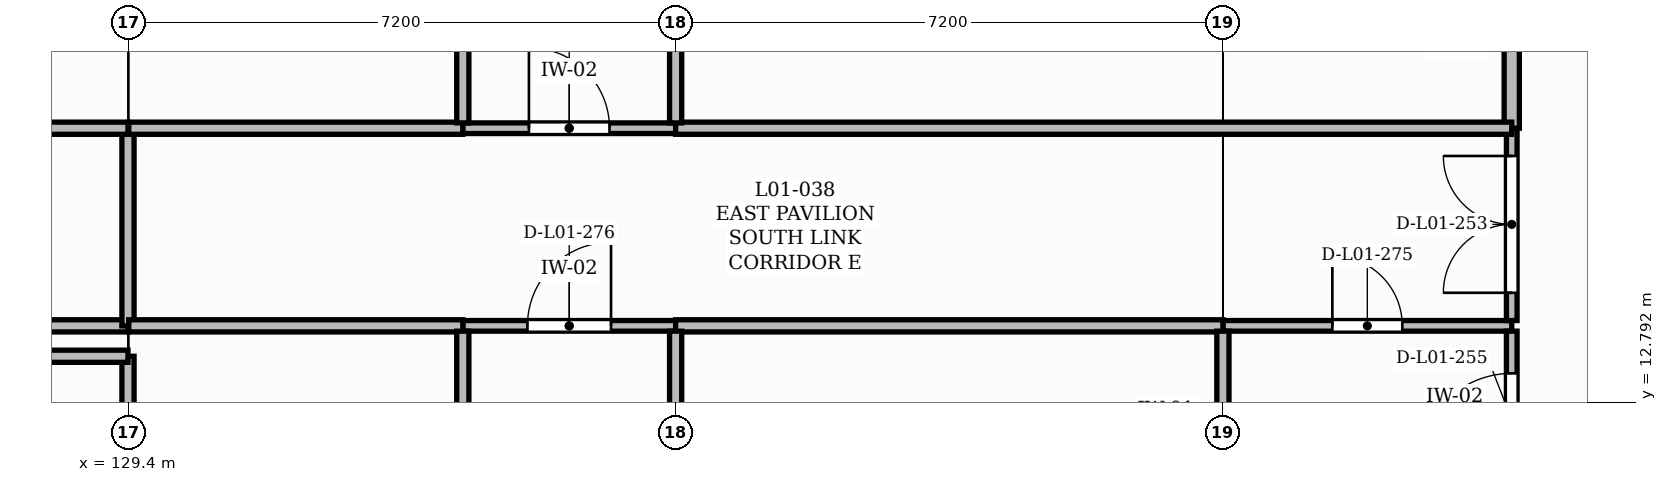
"""IFC4 building model, lengths in metres.
Left out: names, types, materials, properties, quantities, classifications, styles, units other than length and angle.
Written with IfcOpenShell. Run it as: python <this file> out.ifc"""

import sys

from ifc_helpers import new_model, si_unit, direction, frame, frame_2d, origin, place, context, subcontext, project, spatial, rectangle, extrude, element, fill, save


model = new_model("IFC4")
c1 = context("Model", 3, precision=1e-05, world=origin(), true_north=direction((0.0, 1.0)))
c2 = subcontext(c1, "Body", "Model", "MODEL_VIEW")
j1 = project(units=[si_unit("LENGTHUNIT", "METRE"), si_unit("PLANEANGLEUNIT", "RADIAN")], contexts=[c1])
p1 = place(None, origin())
s1 = spatial("IfcSite", under=j1, at=p1, CompositionType="ELEMENT")
p2 = place(p1, origin())
s2 = spatial("IfcBuilding", under=s1, at=p2, CompositionType="ELEMENT")
p3 = place(p2, frame((0.0, 0.0, 4.5)))
s3 = spatial("IfcBuildingStorey", under=s2, at=p3, CompositionType="ELEMENT", Elevation=4.5)
p4 = place(p3, frame((133.8, 13.8, 0.0), z_axis=(0.0, 0.0, 1.0), x_axis=(1.0, 0.0, 0.0)))
e1 = element("IfcWall", 1, at=p4, inside=s3, PredefinedType="PARTITIONING", context=c2, shape_type="SweptSolid", body=[
    extrude(rectangle(XDim=2.8, YDim=0.14, at=frame_2d((1.4, 0.0))), origin(), (0.0, 0.0, 1.0), 4.18),
])
p5 = place(p4, frame((0.85, 0.0, 0.0)))
e2 = element("IfcOpeningElement", 2, at=p5, cuts=e1, PredefinedType="OPENING", context=c2, shape_type="SweptSolid", body=[
    extrude(rectangle(XDim=1.1, YDim=2.1, at=frame_2d((0.55, 1.05))), frame((0.0, 0.08, 0.0), z_axis=(0.0, -1.0, 0.0), x_axis=(1.0, 0.0, 0.0)), (0.0, 0.0, 1.0), 0.16),
])
p6 = place(p3, frame((133.8, 16.4, 0.0), z_axis=(0.0, 0.0, 1.0), x_axis=(1.0, 0.0, 0.0)))
e3 = element("IfcWall", 3, at=p6, inside=s3, PredefinedType="PARTITIONING", context=c2, shape_type="SweptSolid", body=[
    extrude(rectangle(XDim=2.8, YDim=0.14, at=frame_2d((1.4, 0.0))), origin(), (0.0, 0.0, 1.0), 4.18),
])
p7 = place(p6, frame((0.87, 0.0, 0.0)))
e4 = element("IfcOpeningElement", 4, at=p7, cuts=e3, PredefinedType="OPENING", context=c2, shape_type="SweptSolid", body=[
    extrude(rectangle(XDim=1.06, YDim=2.15, at=frame_2d((0.53, 1.075))), frame((0.0, 0.08, 0.0), z_axis=(0.0, -1.0, 0.0), x_axis=(1.0, 0.0, 0.0)), (0.0, 0.0, 1.0), 0.16),
])
p8 = place(p3, frame((143.8, 13.8, 0.0), z_axis=(0.0, 0.0, 1.0), x_axis=(1.0, 0.0, 0.0)))
e5 = element("IfcWall", 5, at=p8, inside=s3, PredefinedType="PARTITIONING", context=c2, shape_type="SweptSolid", body=[
    extrude(rectangle(XDim=3.8, YDim=0.14, at=frame_2d((1.9, 0.0))), origin(), (0.0, 0.0, 1.0), 4.18),
])
p9 = place(p8, frame((1.44, 0.0, 0.0)))
e6 = element("IfcOpeningElement", 6, at=p9, cuts=e5, PredefinedType="OPENING", context=c2, shape_type="SweptSolid", body=[
    extrude(rectangle(XDim=0.92, YDim=2.1, at=frame_2d((0.46, 1.05))), frame((0.0, 0.08, 0.0), z_axis=(0.0, -1.0, 0.0), x_axis=(1.0, 0.0, 0.0)), (0.0, 0.0, 1.0), 0.16),
])
p10 = place(p3, frame((147.6, 11.4, 0.0), z_axis=(0.0, 0.0, 1.0), x_axis=(0.0, 1.0, 0.0)))
e7 = element("IfcWall", 7, at=p10, inside=s3, PredefinedType="PARTITIONING", context=c2, shape_type="SweptSolid", body=[
    extrude(rectangle(XDim=2.33, YDim=0.14, at=frame_2d((1.165, 0.0))), origin(), (0.0, 0.0, 1.0), 4.18),
])
p11 = place(p10, frame((0.555, 0.0, 0.0)))
e8 = element("IfcOpeningElement", 8, at=p11, cuts=e7, PredefinedType="OPENING", context=c2, shape_type="SweptSolid", body=[
    extrude(rectangle(XDim=1.22, YDim=2.1, at=frame_2d((0.61, 1.05))), frame((0.0, 0.08, 0.0), z_axis=(0.0, -1.0, 0.0), x_axis=(1.0, 0.0, 0.0)), (0.0, 0.0, 1.0), 0.16),
])
p12 = place(p3, frame((147.6, 13.87, 0.0), z_axis=(0.0, 0.0, 1.0), x_axis=(0.0, 1.0, 0.0)))
e9 = element("IfcWall", 9, at=p12, inside=s3, PredefinedType="PARTITIONING", context=c2, shape_type="SweptSolid", body=[
    extrude(rectangle(XDim=2.53, YDim=0.14, at=frame_2d((1.265, 0.0))), origin(), (0.0, 0.0, 1.0), 4.18),
])
p13 = place(p12, frame((0.365, 0.0, 0.0)))
e10 = element("IfcOpeningElement", 10, at=p13, cuts=e9, PredefinedType="OPENING", context=c2, shape_type="SweptSolid", body=[
    extrude(rectangle(XDim=1.8, YDim=2.3, at=frame_2d((0.9, 1.15))), frame((0.0, 0.08, 0.0), z_axis=(0.0, -1.0, 0.0), x_axis=(1.0, 0.0, 0.0)), (0.0, 0.0, 1.0), 0.16),
])
p14 = place(p3, frame((147.6, 16.4, 0.0), z_axis=(0.0, 0.0, 1.0), x_axis=(0.0, 1.0, 0.0)))
e11 = element("IfcWall", 11, at=p14, inside=s3, PredefinedType="PARTITIONING", context=c2, shape_type="SweptSolid", body=[
    extrude(rectangle(XDim=2.2, YDim=0.2, at=frame_2d((1.1, 0.0))), origin(), (0.0, 0.0, 1.0), 4.18),
])
p15 = place(p3, frame((129.395, 10.87, 0.0), z_axis=(0.0, 0.0, 1.0), x_axis=(0.0, 1.0, 0.0)))
e12 = element("IfcWall", 12, at=p15, inside=s3, PredefinedType="PARTITIONING", context=c2, shape_type="SweptSolid", body=[
    extrude(rectangle(XDim=2.53, YDim=0.16, at=frame_2d((1.265, 0.0))), origin(), (0.0, 0.0, 1.0), 4.18),
])
for number, where, z_axis, x_axis in (
    (13, (129.395, 13.4, 0.0), (0.0, 0.0, 1.0), (-1.0, 0.0, 0.0)),
    (14, (124.6, 13.8, 0.0), (0.0, 0.0, 1.0), (1.0, 0.0, 0.0)),
):
    element("IfcWall", number, at=place(p3, frame(where, z_axis=z_axis, x_axis=x_axis)), inside=s3, PredefinedType="PARTITIONING", context=c2, shape_type="SweptSolid", body=[
        extrude(rectangle(XDim=4.795, YDim=0.16, at=frame_2d((2.397, 0.0))), origin(), (0.0, 0.0, 1.0), 4.18),
    ])
p16 = place(p3, frame((129.395, 13.8, 0.0), z_axis=(0.0, 0.0, 1.0), x_axis=(0.0, 1.0, 0.0)))
e15 = element("IfcWall", 15, at=p16, inside=s3, PredefinedType="PARTITIONING", context=c2, shape_type="SweptSolid", body=[
    extrude(rectangle(XDim=2.6, YDim=0.16, at=frame_2d((1.3, 0.0))), origin(), (0.0, 0.0, 1.0), 4.18),
])
p17 = place(p3, frame((129.395, 16.4, 0.0), z_axis=(0.0, 0.0, 1.0), x_axis=(-1.0, 0.0, 0.0)))
e16 = element("IfcWall", 16, at=p17, inside=s3, PredefinedType="PARTITIONING", context=c2, shape_type="SweptSolid", body=[
    extrude(rectangle(XDim=4.795, YDim=0.16, at=frame_2d((2.397, 0.0))), origin(), (0.0, 0.0, 1.0), 4.18),
])
p18 = place(p3, frame((129.405, 13.8, 0.0), z_axis=(0.0, 0.0, 1.0), x_axis=(1.0, 0.0, 0.0)))
e17 = element("IfcWall", 17, at=p18, inside=s3, PredefinedType="PARTITIONING", context=c2, shape_type="SweptSolid", body=[
    extrude(rectangle(XDim=4.395, YDim=0.16, at=frame_2d((2.198, 0.0))), origin(), (0.0, 0.0, 1.0), 4.18),
])
p19 = place(p3, frame((136.6, 13.8, 0.0), z_axis=(0.0, 0.0, 1.0), x_axis=(1.0, 0.0, 0.0)))
e18 = element("IfcWall", 18, at=p19, inside=s3, PredefinedType="PARTITIONING", context=c2, shape_type="SweptSolid", body=[
    extrude(rectangle(XDim=7.2, YDim=0.16, at=frame_2d((3.6, 0.0))), origin(), (0.0, 0.0, 1.0), 4.18),
])
p20 = place(p3, frame((147.6, 16.4, 0.0), z_axis=(0.0, 0.0, 1.0), x_axis=(-1.0, 0.0, 0.0)))
e19 = element("IfcWall", 19, at=p20, inside=s3, PredefinedType="PARTITIONING", context=c2, shape_type="SweptSolid", body=[
    extrude(rectangle(XDim=11.0, YDim=0.16, at=frame_2d((5.5, 0.0))), origin(), (0.0, 0.0, 1.0), 4.18),
])
p21 = place(p3, frame((133.8, 16.4, 0.0), z_axis=(0.0, 0.0, 1.0), x_axis=(-1.0, 0.0, 0.0)))
e20 = element("IfcWall", 20, at=p21, inside=s3, PredefinedType="PARTITIONING", context=c2, shape_type="SweptSolid", body=[
    extrude(rectangle(XDim=4.395, YDim=0.16, at=frame_2d((2.198, 0.0))), origin(), (0.0, 0.0, 1.0), 4.18),
])
for number, where, z_axis, x_axis in (
    (21, (143.8, 11.65, 0.0), (0.0, 0.0, 1.0), (0.0, 1.0, 0.0)),
    (22, (136.6, 11.65, 0.0), (0.0, 0.0, 1.0), (0.0, 1.0, 0.0)),
):
    element("IfcWall", number, at=place(p3, frame(where, z_axis=z_axis, x_axis=x_axis)), inside=s3, PredefinedType="PARTITIONING", context=c2, shape_type="SweptSolid", body=[
        extrude(rectangle(XDim=2.08, YDim=0.16, at=frame_2d((1.04, 0.0))), origin(), (0.0, 0.0, 1.0), 3.52),
    ])
p22 = place(p3, frame((133.8, 9.8, 0.0), z_axis=(0.0, 0.0, 1.0), x_axis=(0.0, 1.0, 0.0)))
e23 = element("IfcWall", 23, at=p22, inside=s3, PredefinedType="PARTITIONING", context=c2, shape_type="SweptSolid", body=[
    extrude(rectangle(XDim=3.93, YDim=0.16, at=frame_2d((1.965, 0.0))), origin(), (0.0, 0.0, 1.0), 4.18),
])
p23 = place(p3, frame((136.6, 16.47, 0.0), z_axis=(0.0, 0.0, 1.0), x_axis=(0.0, 1.0, 0.0)))
e24 = element("IfcWall", 24, at=p23, inside=s3, PredefinedType="PARTITIONING", context=c2, shape_type="SweptSolid", body=[
    extrude(rectangle(XDim=1.88, YDim=0.16, at=frame_2d((0.94, 0.0))), origin(), (0.0, 0.0, 1.0), 3.52),
])
p24 = place(p3, frame((133.8, 16.47, 0.0), z_axis=(0.0, 0.0, 1.0), x_axis=(0.0, 1.0, 0.0)))
e25 = element("IfcWall", 25, at=p24, inside=s3, PredefinedType="PARTITIONING", context=c2, shape_type="SweptSolid", body=[
    extrude(rectangle(XDim=2.13, YDim=0.16, at=frame_2d((1.065, 0.0))), origin(), (0.0, 0.0, 1.0), 4.18),
])
p25 = place(p13, origin())
e26 = element("IfcDoor", 26, at=p25, inside=s3, OperationType="DOUBLE_DOOR_SINGLE_SWING", PredefinedType="DOOR", context=c2, shape_type="SweptSolid", body=[
    extrude(rectangle(XDim=1.8, YDim=2.3, at=frame_2d((0.9, 1.15))), frame((0.0, 0.025, 0.0), z_axis=(0.0, -1.0, 0.0), x_axis=(1.0, 0.0, 0.0)), (0.0, 0.0, 1.0), 0.05),
])
fill(e10, e26)
p26 = place(p11, origin())
e27 = element("IfcDoor", 27, at=p26, inside=s3, OperationType="SINGLE_SWING_LEFT", PredefinedType="DOOR", context=c2, shape_type="SweptSolid", body=[
    extrude(rectangle(XDim=1.22, YDim=2.1, at=frame_2d((0.61, 1.05))), frame((0.0, 0.025, 0.0), z_axis=(0.0, -1.0, 0.0), x_axis=(1.0, 0.0, 0.0)), (0.0, 0.0, 1.0), 0.05),
])
fill(e8, e27)
p27 = place(p9, origin())
e28 = element("IfcDoor", 28, at=p27, inside=s3, OperationType="SINGLE_SWING_LEFT", PredefinedType="DOOR", context=c2, shape_type="SweptSolid", body=[
    extrude(rectangle(XDim=0.92, YDim=2.1, at=frame_2d((0.46, 1.05))), frame((0.0, 0.025, 0.0), z_axis=(0.0, -1.0, 0.0), x_axis=(1.0, 0.0, 0.0)), (0.0, 0.0, 1.0), 0.05),
])
fill(e6, e28)
p28 = place(p5, origin())
e29 = element("IfcDoor", 29, at=p28, inside=s3, OperationType="SINGLE_SWING_RIGHT", PredefinedType="DOOR", context=c2, shape_type="SweptSolid", body=[
    extrude(rectangle(XDim=1.1, YDim=2.1, at=frame_2d((0.55, 1.05))), frame((0.0, 0.025, 0.0), z_axis=(0.0, -1.0, 0.0), x_axis=(1.0, 0.0, 0.0)), (0.0, 0.0, 1.0), 0.05),
])
fill(e2, e29)
p29 = place(p7, origin())
e30 = element("IfcDoor", 30, at=p29, inside=s3, OperationType="SINGLE_SWING_LEFT", PredefinedType="DOOR", context=c2, shape_type="SweptSolid", body=[
    extrude(rectangle(XDim=1.06, YDim=2.15, at=frame_2d((0.53, 1.075))), frame((0.0, 0.025, 0.0), z_axis=(0.0, -1.0, 0.0), x_axis=(1.0, 0.0, 0.0)), (0.0, 0.0, 1.0), 0.05),
])
fill(e4, e30)
save(model, sys.argv[1])
